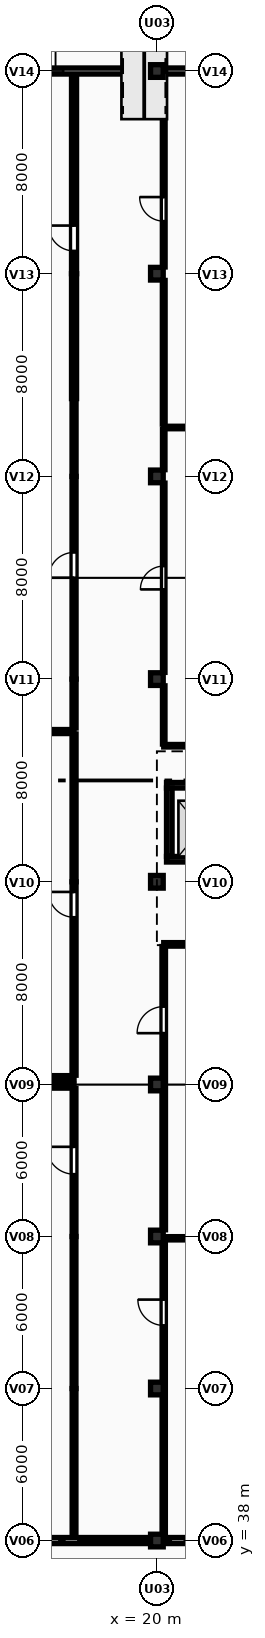
"""IFC4 building model, lengths in metres.
Left out: names, types, materials, properties, quantities, classifications, styles, units other than length and angle.
Written with IfcOpenShell. Run it as: python <this file> out.ifc"""

import sys

from ifc_helpers import new_model, si_unit, direction, frame, frame_2d, origin, origin_2d, place, context, subcontext, project, spatial, rectangle, extrude, element, fill, save


model = new_model("IFC4")
c1 = context("Model", 3, precision=1e-05, world=origin(), true_north=direction((0.0, 1.0)))
c2 = subcontext(c1, "Body", "Model", "MODEL_VIEW")
j1 = project(units=[si_unit("LENGTHUNIT", "METRE"), si_unit("PLANEANGLEUNIT", "RADIAN")], contexts=[c1])
p1 = place(None, origin())
s1 = spatial("IfcSite", under=j1, at=p1, CompositionType="ELEMENT")
p2 = place(p1, origin())
s2 = spatial("IfcBuilding", under=s1, at=p2, CompositionType="ELEMENT")
p3 = place(p2, origin())
s3 = spatial("IfcBuildingStorey", under=s2, at=p3, CompositionType="ELEMENT", Elevation=0.0)
for number, where, z_axis, x_axis in (
    (1, (20.0, 38.0, -0.2), (0.0, 0.0, 1.0), (1.0, 0.0, 0.0)),
    (2, (20.0, 44.0, -0.2), (0.0, 0.0, 1.0), (1.0, 0.0, 0.0)),
    (3, (20.0, 50.0, -0.2), (0.0, 0.0, 1.0), (1.0, 0.0, 0.0)),
    (4, (20.0, 56.0, -0.2), (0.0, 0.0, 1.0), (1.0, 0.0, 0.0)),
    (5, (20.0, 64.0, -0.2), (0.0, 0.0, 1.0), (1.0, 0.0, 0.0)),
    (6, (20.0, 72.0, -0.2), (0.0, 0.0, 1.0), (1.0, 0.0, 0.0)),
    (7, (20.0, 80.0, -0.2), (0.0, 0.0, 1.0), (1.0, 0.0, 0.0)),
    (8, (20.0, 88.0, -0.2), (0.0, 0.0, 1.0), (1.0, 0.0, 0.0)),
    (9, (20.0, 96.0, -0.2), (0.0, 0.0, 1.0), (1.0, 0.0, 0.0)),
):
    element("IfcColumn", number, at=place(p3, frame(where, z_axis=z_axis, x_axis=x_axis)), inside=s3, PredefinedType="COLUMN", context=c2, shape_type="SweptSolid", body=[
        extrude(rectangle(XDim=0.5, YDim=0.5, at=origin_2d()), origin(), (0.0, 0.0, 1.0), 4.7),
    ])
p4 = place(p3, frame((12.25, 96.0, 0.0), z_axis=(0.0, 0.0, 1.0), x_axis=(1.0, 0.0, 0.0)))
e10 = element("IfcWall", 10, at=p4, inside=s3, PredefinedType="SOLIDWALL", context=c2, shape_type="SweptSolid", body=[
    extrude(rectangle(XDim=7.5, YDim=0.24, at=frame_2d((3.75, 0.0))), origin(), (0.0, 0.0, 1.0), 3.59),
])
p5 = place(p4, frame((1.65, 0.0, 0.95)))
e11 = element("IfcOpeningElement", 11, at=p5, cuts=e10, PredefinedType="OPENING", context=c2, shape_type="SweptSolid", body=[
    extrude(rectangle(XDim=2.4, YDim=1.35, at=frame_2d((1.2, 0.675))), frame((0.0, 0.13, 0.0), z_axis=(0.0, -1.0, 0.0), x_axis=(1.0, 0.0, 0.0)), (0.0, 0.0, 1.0), 0.26),
])
p6 = place(p3, frame((20.25, 96.0, 0.0), z_axis=(0.0, 0.0, 1.0), x_axis=(1.0, 0.0, 0.0)))
e12 = element("IfcWall", 12, at=p6, inside=s3, PredefinedType="SOLIDWALL", context=c2, shape_type="SweptSolid", body=[
    extrude(rectangle(XDim=7.5, YDim=0.24, at=frame_2d((3.75, 0.0))), origin(), (0.0, 0.0, 1.0), 3.59),
])
p7 = place(p6, frame((2.8, 0.0, 0.0)))
e13 = element("IfcOpeningElement", 13, at=p7, cuts=e12, PredefinedType="OPENING", context=c2, shape_type="SweptSolid", body=[
    extrude(rectangle(XDim=1.9, YDim=2.25, at=frame_2d((0.95, 1.125))), frame((0.0, 0.13, 0.0), z_axis=(0.0, -1.0, 0.0), x_axis=(1.0, 0.0, 0.0)), (0.0, 0.0, 1.0), 0.26),
])
p8 = place(p3, frame((27.75, 38.0, 0.0), z_axis=(0.0, 0.0, 1.0), x_axis=(-1.0, 0.0, 0.0)))
e14 = element("IfcWall", 14, at=p8, inside=s3, PredefinedType="SOLIDWALL", context=c2, shape_type="SweptSolid", body=[
    extrude(rectangle(XDim=7.5, YDim=0.24, at=frame_2d((3.75, 0.0))), origin(), (0.0, 0.0, 1.0), 3.59),
])
p9 = place(p8, frame((2.75, 0.0, 0.95)))
e15 = element("IfcOpeningElement", 15, at=p9, cuts=e14, PredefinedType="OPENING", context=c2, shape_type="SweptSolid", body=[
    extrude(rectangle(XDim=2.0, YDim=1.8, at=frame_2d((1.0, 0.9))), frame((0.0, 0.13, 0.0), z_axis=(0.0, -1.0, 0.0), x_axis=(1.0, 0.0, 0.0)), (0.0, 0.0, 1.0), 0.26),
])
p10 = place(p3, frame((19.75, 38.0, 0.0), z_axis=(0.0, 0.0, 1.0), x_axis=(-1.0, 0.0, 0.0)))
e16 = element("IfcWall", 16, at=p10, inside=s3, PredefinedType="SOLIDWALL", context=c2, shape_type="SweptSolid", body=[
    extrude(rectangle(XDim=7.5, YDim=0.24, at=frame_2d((3.75, 0.0))), origin(), (0.0, 0.0, 1.0), 3.59),
])
p11 = place(p3, frame((23.12, 64.89, 0.0), z_axis=(0.0, 0.0, 1.0), x_axis=(-1.0, 0.0, 0.0)))
e17 = element("IfcWall", 17, at=p11, inside=s3, PredefinedType="SHEAR", context=c2, shape_type="SweptSolid", body=[
    extrude(rectangle(XDim=2.74, YDim=0.22, at=frame_2d((1.37, 0.0))), origin(), (0.0, 0.0, 1.0), 4.24),
])
p12 = place(p11, frame((0.87, 0.0, 0.0)))
e18 = element("IfcOpeningElement", 18, at=p12, cuts=e17, PredefinedType="OPENING", context=c2, shape_type="SweptSolid", body=[
    extrude(rectangle(XDim=1.0, YDim=2.15, at=frame_2d((0.5, 1.075))), frame((0.0, 0.12, 0.0), z_axis=(0.0, -1.0, 0.0), x_axis=(1.0, 0.0, 0.0)), (0.0, 0.0, 1.0), 0.24),
])
p13 = place(p3, frame((20.38, 67.81, 0.0), z_axis=(0.0, 0.0, 1.0), x_axis=(1.0, 0.0, 0.0)))
e19 = element("IfcWall", 19, at=p13, inside=s3, PredefinedType="SHEAR", context=c2, shape_type="SweptSolid", body=[
    extrude(rectangle(XDim=2.74, YDim=0.22, at=frame_2d((1.37, 0.0))), origin(), (0.0, 0.0, 1.0), 4.24),
])
p14 = place(p3, frame((20.49, 65.0, 0.0), z_axis=(0.0, 0.0, 1.0), x_axis=(0.0, 1.0, 0.0)))
e20 = element("IfcWall", 20, at=p14, inside=s3, PredefinedType="SHEAR", context=c2, shape_type="SweptSolid", body=[
    extrude(rectangle(XDim=2.7, YDim=0.22, at=frame_2d((1.35, 0.0))), origin(), (0.0, 0.0, 1.0), 4.24),
])
p15 = place(p3, frame((12.265, 56.27, 0.0), z_axis=(0.0, 0.0, 1.0), x_axis=(1.0, 0.0, 0.0)))
e21 = element("IfcWall", 21, at=p15, inside=s3, PredefinedType="PARTITIONING", context=c2, shape_type="SweptSolid", body=[
    extrude(rectangle(XDim=4.465, YDim=0.16, at=frame_2d((2.232, 0.0))), origin(), (0.0, 0.0, 1.0), 3.59),
])
p16 = place(p3, frame((12.0, 69.93, 0.0), z_axis=(0.0, 0.0, 1.0), x_axis=(1.0, 0.0, 0.0)))
e22 = element("IfcWall", 22, at=p16, inside=s3, PredefinedType="PARTITIONING", context=c2, shape_type="SweptSolid", body=[
    extrude(rectangle(XDim=4.73, YDim=0.16, at=frame_2d((2.365, 0.0))), origin(), (0.0, 0.0, 1.0), 4.24),
])
p17 = place(p3, frame((16.73, 56.365, 0.0), z_axis=(0.0, 0.0, 1.0), x_axis=(0.0, 1.0, 0.0)))
e23 = element("IfcWall", 23, at=p17, inside=s3, PredefinedType="PARTITIONING", context=c2, shape_type="SweptSolid", body=[
    extrude(rectangle(XDim=7.635, YDim=0.16, at=frame_2d((3.817, 0.0))), origin(), (0.0, 0.0, 1.0), 4.24),
])
p18 = place(p17, frame((6.235, 0.0, 0.0)))
e24 = element("IfcOpeningElement", 24, at=p18, cuts=e23, PredefinedType="OPENING", context=c2, shape_type="SweptSolid", body=[
    extrude(rectangle(XDim=1.0, YDim=2.15, at=frame_2d((0.5, 1.075))), frame((0.0, 0.09, 0.0), z_axis=(0.0, -1.0, 0.0), x_axis=(1.0, 0.0, 0.0)), (0.0, 0.0, 1.0), 0.18),
])
p19 = place(p3, frame((16.73, 64.0, 0.0), z_axis=(0.0, 0.0, 1.0), x_axis=(0.0, 1.0, 0.0)))
e25 = element("IfcWall", 25, at=p19, inside=s3, PredefinedType="PARTITIONING", context=c2, shape_type="SweptSolid", body=[
    extrude(rectangle(XDim=5.835, YDim=0.16, at=frame_2d((2.917, 0.0))), origin(), (0.0, 0.0, 1.0), 4.24),
])
p20 = place(p3, frame((16.73, 70.07, 0.0), z_axis=(0.0, 0.0, 1.0), x_axis=(0.0, 1.0, 0.0)))
e26 = element("IfcWall", 26, at=p20, inside=s3, PredefinedType="PARTITIONING", context=c2, shape_type="SweptSolid", body=[
    extrude(rectangle(XDim=1.93, YDim=0.16, at=frame_2d((0.965, 0.0))), origin(), (0.0, 0.0, 1.0), 4.24),
])
p21 = place(p3, frame((16.73, 72.0, 0.0), z_axis=(0.0, 0.0, 1.0), x_axis=(0.0, 1.0, 0.0)))
e27 = element("IfcWall", 27, at=p21, inside=s3, PredefinedType="PARTITIONING", context=c2, shape_type="SweptSolid", body=[
    extrude(rectangle(XDim=8.0, YDim=0.16, at=frame_2d((4.0, 0.0))), origin(), (0.0, 0.0, 1.0), 4.24),
])
p22 = place(p21, frame((4.0, 0.0, 0.0)))
e28 = element("IfcOpeningElement", 28, at=p22, cuts=e27, PredefinedType="OPENING", context=c2, shape_type="SweptSolid", body=[
    extrude(rectangle(XDim=1.0, YDim=2.15, at=frame_2d((0.5, 1.075))), frame((0.0, 0.09, 0.0), z_axis=(0.0, -1.0, 0.0), x_axis=(1.0, 0.0, 0.0)), (0.0, 0.0, 1.0), 0.18),
])
p23 = place(p3, frame((16.73, 80.0, 0.0), z_axis=(0.0, 0.0, 1.0), x_axis=(0.0, 1.0, 0.0)))
e29 = element("IfcWall", 29, at=p23, inside=s3, PredefinedType="PARTITIONING", context=c2, shape_type="SweptSolid", body=[
    extrude(rectangle(XDim=2.93, YDim=0.16, at=frame_2d((1.465, 0.0))), origin(), (0.0, 0.0, 1.0), 4.24),
])
p24 = place(p3, frame((16.73, 83.07, 0.0), z_axis=(0.0, 0.0, 1.0), x_axis=(0.0, 1.0, 0.0)))
e30 = element("IfcWall", 30, at=p24, inside=s3, PredefinedType="PARTITIONING", context=c2, shape_type="SweptSolid", body=[
    extrude(rectangle(XDim=4.93, YDim=0.2, at=frame_2d((2.465, 0.0))), origin(), (0.0, 0.0, 1.0), 4.24),
])
p25 = place(p3, frame((16.73, 88.0, 0.0), z_axis=(0.0, 0.0, 1.0), x_axis=(0.0, 1.0, 0.0)))
e31 = element("IfcWall", 31, at=p25, inside=s3, PredefinedType="PARTITIONING", context=c2, shape_type="SweptSolid", body=[
    extrude(rectangle(XDim=7.838, YDim=0.2, at=frame_2d((3.919, 0.0))), origin(), (0.0, 0.0, 1.0), 4.24),
])
p26 = place(p25, frame((0.9, 0.0, 0.0)))
e32 = element("IfcOpeningElement", 32, at=p26, cuts=e31, PredefinedType="OPENING", context=c2, shape_type="SweptSolid", body=[
    extrude(rectangle(XDim=1.0, YDim=2.15, at=frame_2d((0.5, 1.075))), frame((0.0, 0.11, 0.0), z_axis=(0.0, -1.0, 0.0), x_axis=(1.0, 0.0, 0.0)), (0.0, 0.0, 1.0), 0.22),
])
for number, where, z_axis, x_axis in (
    (33, (20.27, 69.37, 0.0), (0.0, 0.0, 1.0), (1.0, 0.0, 0.0)),
    (34, (20.27, 81.93, 0.0), (0.0, 0.0, 1.0), (1.0, 0.0, 0.0)),
):
    element("IfcWall", number, at=place(p3, frame(where, z_axis=z_axis, x_axis=x_axis)), inside=s3, PredefinedType="PARTITIONING", context=c2, shape_type="SweptSolid", body=[
        extrude(rectangle(XDim=7.73, YDim=0.1, at=frame_2d((3.865, 0.0))), origin(), (0.0, 0.0, 1.0), 4.24),
    ])
p27 = place(p3, frame((20.27, 69.435, 0.0), z_axis=(0.0, 0.0, 1.0), x_axis=(0.0, 1.0, 0.0)))
e35 = element("IfcWall", 35, at=p27, inside=s3, PredefinedType="PARTITIONING", context=c2, shape_type="SweptSolid", body=[
    extrude(rectangle(XDim=2.3, YDim=0.1, at=frame_2d((1.15, 0.0))), origin(), (0.0, 0.0, 1.0), 3.59),
])
p28 = place(p3, frame((20.27, 72.265, 0.0), z_axis=(0.0, 0.0, 1.0), x_axis=(0.0, 1.0, 0.0)))
e36 = element("IfcWall", 36, at=p28, inside=s3, PredefinedType="PARTITIONING", context=c2, shape_type="SweptSolid", body=[
    extrude(rectangle(XDim=7.47, YDim=0.1, at=frame_2d((3.735, 0.0))), origin(), (0.0, 0.0, 1.0), 3.59),
])
p29 = place(p28, frame((3.275, 0.0, 0.0)))
e37 = element("IfcOpeningElement", 37, at=p29, cuts=e36, PredefinedType="OPENING", context=c2, shape_type="SweptSolid", body=[
    extrude(rectangle(XDim=0.92, YDim=2.1, at=frame_2d((0.46, 1.05))), frame((0.0, 0.06, 0.0), z_axis=(0.0, -1.0, 0.0), x_axis=(1.0, 0.0, 0.0)), (0.0, 0.0, 1.0), 0.12),
])
p30 = place(p3, frame((20.27, 80.265, 0.0), z_axis=(0.0, 0.0, 1.0), x_axis=(0.0, 1.0, 0.0)))
e38 = element("IfcWall", 38, at=p30, inside=s3, PredefinedType="PARTITIONING", context=c2, shape_type="SweptSolid", body=[
    extrude(rectangle(XDim=1.6, YDim=0.1, at=frame_2d((0.8, 0.0))), origin(), (0.0, 0.0, 1.0), 3.59),
])
p31 = place(p3, frame((20.27, 82.07, 0.0), z_axis=(0.0, 0.0, 1.0), x_axis=(0.0, 1.0, 0.0)))
e39 = element("IfcWall", 39, at=p31, inside=s3, PredefinedType="PARTITIONING", context=c2, shape_type="SweptSolid", body=[
    extrude(rectangle(XDim=5.665, YDim=0.11, at=frame_2d((2.833, 0.0))), origin(), (0.0, 0.0, 1.0), 3.59),
])
p32 = place(p3, frame((20.27, 88.265, 0.0), z_axis=(0.0, 0.0, 1.0), x_axis=(0.0, 1.0, 0.0)))
e40 = element("IfcWall", 40, at=p32, inside=s3, PredefinedType="PARTITIONING", context=c2, shape_type="SweptSolid", body=[
    extrude(rectangle(XDim=7.47, YDim=0.11, at=frame_2d((3.735, 0.0))), origin(), (0.0, 0.0, 1.0), 3.59),
])
p33 = place(p32, frame((1.81, 0.0, 0.0)))
e41 = element("IfcOpeningElement", 41, at=p33, cuts=e40, PredefinedType="OPENING", context=c2, shape_type="SweptSolid", body=[
    extrude(rectangle(XDim=0.95, YDim=2.1, at=frame_2d((0.475, 1.05))), frame((0.0, 0.065, 0.0), z_axis=(0.0, -1.0, 0.0), x_axis=(1.0, 0.0, 0.0)), (0.0, 0.0, 1.0), 0.13),
])
p34 = place(p3, frame((20.27, 49.93, 0.0), z_axis=(0.0, 0.0, 1.0), x_axis=(1.0, 0.0, 0.0)))
e42 = element("IfcWall", 42, at=p34, inside=s3, PredefinedType="PARTITIONING", context=c2, shape_type="SweptSolid", body=[
    extrude(rectangle(XDim=7.465, YDim=0.13, at=frame_2d((3.732, 0.0))), origin(), (0.0, 0.0, 1.0), 3.59),
])
p35 = place(p3, frame((20.27, 38.265, 0.0), z_axis=(0.0, 0.0, 1.0), x_axis=(0.0, 1.0, 0.0)))
e43 = element("IfcWall", 43, at=p35, inside=s3, PredefinedType="PARTITIONING", context=c2, shape_type="SweptSolid", body=[
    extrude(rectangle(XDim=11.47, YDim=0.13, at=frame_2d((5.735, 0.0))), origin(), (0.0, 0.0, 1.0), 3.59),
])
p36 = place(p35, frame((8.225, 0.0, 0.0)))
e44 = element("IfcOpeningElement", 44, at=p36, cuts=e43, PredefinedType="OPENING", context=c2, shape_type="SweptSolid", body=[
    extrude(rectangle(XDim=1.02, YDim=2.1, at=frame_2d((0.51, 1.05))), frame((0.0, 0.075, 0.0), z_axis=(0.0, -1.0, 0.0), x_axis=(1.0, 0.0, 0.0)), (0.0, 0.0, 1.0), 0.15),
])
p37 = place(p3, frame((20.27, 61.53, 0.0), z_axis=(0.0, 0.0, 1.0), x_axis=(1.0, 0.0, 0.0)))
e45 = element("IfcWall", 45, at=p37, inside=s3, PredefinedType="PARTITIONING", context=c2, shape_type="SweptSolid", body=[
    extrude(rectangle(XDim=7.73, YDim=0.14, at=frame_2d((3.865, 0.0))), origin(), (0.0, 0.0, 1.0), 4.24),
])
p38 = place(p3, frame((20.27, 50.265, 0.0), z_axis=(0.0, 0.0, 1.0), x_axis=(0.0, 1.0, 0.0)))
e46 = element("IfcWall", 46, at=p38, inside=s3, PredefinedType="PARTITIONING", context=c2, shape_type="SweptSolid", body=[
    extrude(rectangle(XDim=11.18, YDim=0.14, at=frame_2d((5.59, 0.0))), origin(), (0.0, 0.0, 1.0), 3.59),
])
p39 = place(p38, frame((7.76, 0.0, 0.0)))
e47 = element("IfcOpeningElement", 47, at=p39, cuts=e46, PredefinedType="OPENING", context=c2, shape_type="SweptSolid", body=[
    extrude(rectangle(XDim=1.05, YDim=2.1, at=frame_2d((0.525, 1.05))), frame((0.0, 0.08, 0.0), z_axis=(0.0, -1.0, 0.0), x_axis=(1.0, 0.0, 0.0)), (0.0, 0.0, 1.0), 0.16),
])
p40 = place(p3, frame((11.005, 55.93, 0.0), z_axis=(0.0, 0.0, 1.0), x_axis=(1.0, 0.0, 0.0)))
e48 = element("IfcWall", 48, at=p40, inside=s3, PredefinedType="PARTITIONING", context=c2, shape_type="SweptSolid", body=[
    extrude(rectangle(XDim=5.725, YDim=0.15, at=frame_2d((2.863, 0.0))), origin(), (0.0, 0.0, 1.0), 3.59),
])
p41 = place(p3, frame((16.73, 38.162, 0.0), z_axis=(0.0, 0.0, 1.0), x_axis=(0.0, 1.0, 0.0)))
e49 = element("IfcWall", 49, at=p41, inside=s3, PredefinedType="PARTITIONING", context=c2, shape_type="SweptSolid", body=[
    extrude(rectangle(XDim=5.838, YDim=0.15, at=frame_2d((2.919, 0.0))), origin(), (0.0, 0.0, 1.0), 4.24),
])
p42 = place(p3, frame((16.73, 44.0, 0.0), z_axis=(0.0, 0.0, 1.0), x_axis=(0.0, 1.0, 0.0)))
e50 = element("IfcWall", 50, at=p42, inside=s3, PredefinedType="PARTITIONING", context=c2, shape_type="SweptSolid", body=[
    extrude(rectangle(XDim=6.0, YDim=0.15, at=frame_2d((3.0, 0.0))), origin(), (0.0, 0.0, 1.0), 4.24),
])
p43 = place(p3, frame((16.73, 50.0, 0.0), z_axis=(0.0, 0.0, 1.0), x_axis=(0.0, 1.0, 0.0)))
e51 = element("IfcWall", 51, at=p43, inside=s3, PredefinedType="PARTITIONING", context=c2, shape_type="SweptSolid", body=[
    extrude(rectangle(XDim=5.84, YDim=0.15, at=frame_2d((2.92, 0.0))), origin(), (0.0, 0.0, 1.0), 4.24),
])
p44 = place(p43, frame((2.46, 0.0, 0.0)))
e52 = element("IfcOpeningElement", 52, at=p44, cuts=e51, PredefinedType="OPENING", context=c2, shape_type="SweptSolid", body=[
    extrude(rectangle(XDim=1.08, YDim=2.15, at=frame_2d((0.54, 1.075))), frame((0.0, 0.085, 0.0), z_axis=(0.0, -1.0, 0.0), x_axis=(1.0, 0.0, 0.0)), (0.0, 0.0, 1.0), 0.17),
])
p45 = place(p5, origin())
e53 = element("IfcWindow", 53, at=p45, inside=s3, PartitioningType="DOUBLE_PANEL_VERTICAL", PredefinedType="WINDOW", context=c2, shape_type="SweptSolid", body=[
    extrude(rectangle(XDim=2.4, YDim=1.35, at=frame_2d((1.2, 0.675))), frame((0.0, 0.03, 0.0), z_axis=(0.0, -1.0, 0.0), x_axis=(1.0, 0.0, 0.0)), (0.0, 0.0, 1.0), 0.06),
])
fill(e11, e53)
p46 = place(p18, origin())
e54 = element("IfcDoor", 54, at=p46, inside=s3, OperationType="SINGLE_SWING_RIGHT", PredefinedType="DOOR", context=c2, shape_type="SweptSolid", body=[
    extrude(rectangle(XDim=1.0, YDim=2.15, at=frame_2d((0.5, 1.075))), frame((0.0, 0.025, 0.0), z_axis=(0.0, -1.0, 0.0), x_axis=(1.0, 0.0, 0.0)), (0.0, 0.0, 1.0), 0.05),
])
fill(e24, e54)
p47 = place(p22, origin())
e55 = element("IfcDoor", 55, at=p47, inside=s3, OperationType="SINGLE_SWING_LEFT", PredefinedType="DOOR", context=c2, shape_type="SweptSolid", body=[
    extrude(rectangle(XDim=1.0, YDim=2.15, at=frame_2d((0.5, 1.075))), frame((0.0, 0.025, 0.0), z_axis=(0.0, -1.0, 0.0), x_axis=(1.0, 0.0, 0.0)), (0.0, 0.0, 1.0), 0.05),
])
fill(e28, e55)
p48 = place(p26, origin())
e56 = element("IfcDoor", 56, at=p48, inside=s3, OperationType="SINGLE_SWING_RIGHT", PredefinedType="DOOR", context=c2, shape_type="SweptSolid", body=[
    extrude(rectangle(XDim=1.0, YDim=2.15, at=frame_2d((0.5, 1.075))), frame((0.0, 0.025, 0.0), z_axis=(0.0, -1.0, 0.0), x_axis=(1.0, 0.0, 0.0)), (0.0, 0.0, 1.0), 0.05),
])
fill(e32, e56)
p49 = place(p29, origin())
e57 = element("IfcDoor", 57, at=p49, inside=s3, OperationType="SINGLE_SWING_LEFT", PredefinedType="DOOR", context=c2, shape_type="SweptSolid", body=[
    extrude(rectangle(XDim=0.92, YDim=2.1, at=frame_2d((0.46, 1.05))), frame((0.0, 0.025, 0.0), z_axis=(0.0, -1.0, 0.0), x_axis=(1.0, 0.0, 0.0)), (0.0, 0.0, 1.0), 0.05),
])
fill(e37, e57)
p50 = place(p33, origin())
e58 = element("IfcDoor", 58, at=p50, inside=s3, OperationType="SINGLE_SWING_RIGHT", PredefinedType="DOOR", context=c2, shape_type="SweptSolid", body=[
    extrude(rectangle(XDim=0.95, YDim=2.1, at=frame_2d((0.475, 1.05))), frame((0.0, 0.025, 0.0), z_axis=(0.0, -1.0, 0.0), x_axis=(1.0, 0.0, 0.0)), (0.0, 0.0, 1.0), 0.05),
])
fill(e41, e58)
p51 = place(p36, origin())
e59 = element("IfcDoor", 59, at=p51, inside=s3, OperationType="SINGLE_SWING_RIGHT", PredefinedType="DOOR", context=c2, shape_type="SweptSolid", body=[
    extrude(rectangle(XDim=1.02, YDim=2.1, at=frame_2d((0.51, 1.05))), frame((0.0, 0.025, 0.0), z_axis=(0.0, -1.0, 0.0), x_axis=(1.0, 0.0, 0.0)), (0.0, 0.0, 1.0), 0.05),
])
fill(e44, e59)
p52 = place(p39, origin())
e60 = element("IfcDoor", 60, at=p52, inside=s3, OperationType="SINGLE_SWING_LEFT", PredefinedType="DOOR", context=c2, shape_type="SweptSolid", body=[
    extrude(rectangle(XDim=1.05, YDim=2.1, at=frame_2d((0.525, 1.05))), frame((0.0, 0.025, 0.0), z_axis=(0.0, -1.0, 0.0), x_axis=(1.0, 0.0, 0.0)), (0.0, 0.0, 1.0), 0.05),
])
fill(e47, e60)
p53 = place(p44, origin())
e61 = element("IfcDoor", 61, at=p53, inside=s3, OperationType="SINGLE_SWING_RIGHT", PredefinedType="DOOR", context=c2, shape_type="SweptSolid", body=[
    extrude(rectangle(XDim=1.08, YDim=2.15, at=frame_2d((0.54, 1.075))), frame((0.0, 0.025, 0.0), z_axis=(0.0, -1.0, 0.0), x_axis=(1.0, 0.0, 0.0)), (0.0, 0.0, 1.0), 0.05),
])
fill(e52, e61)
save(model, sys.argv[1])
